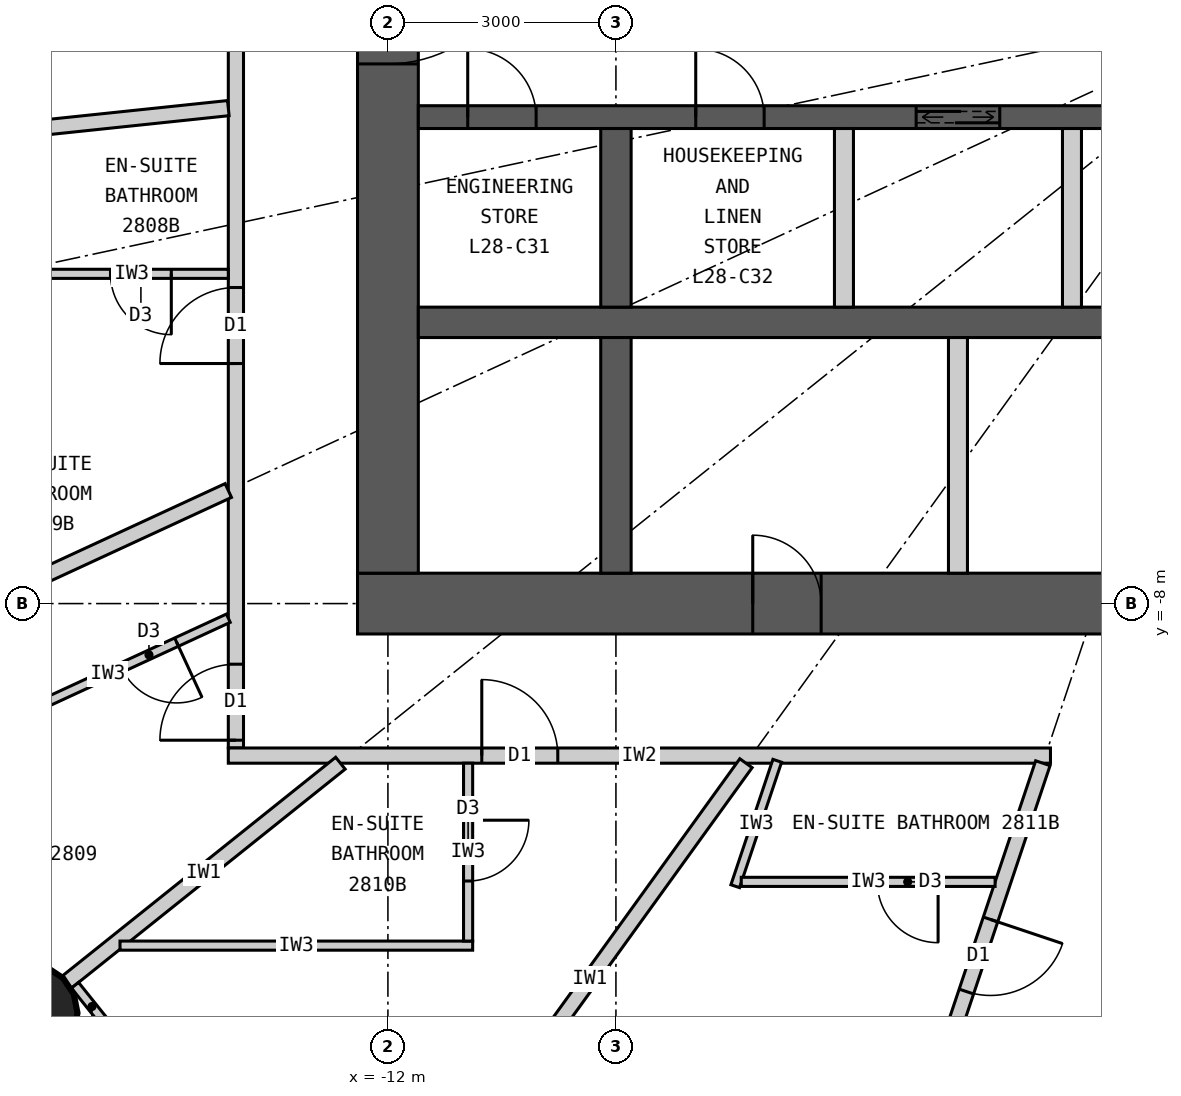
"""IFC4 building model, lengths in metres.
Left out: names, types, materials, properties, quantities, classifications, styles, units other than length and angle.
Written with IfcOpenShell. Run it as: python <this file> out.ifc"""

import sys

from ifc_helpers import new_model, si_unit, direction, frame, frame_2d, origin, origin_2d, place, context, subcontext, project, spatial, rectangle, circle, extrude, element, fill, save


model = new_model("IFC4")
c1 = context("Model", 3, precision=1e-05, world=origin(), true_north=direction((0.0, 1.0)))
c2 = subcontext(c1, "Body", "Model", "MODEL_VIEW")
j1 = project(units=[si_unit("LENGTHUNIT", "METRE"), si_unit("PLANEANGLEUNIT", "RADIAN")], contexts=[c1])
p1 = place(None, origin())
s1 = spatial("IfcSite", under=j1, at=p1, CompositionType="ELEMENT")
p2 = place(p1, origin())
s2 = spatial("IfcBuilding", under=s1, at=p2, CompositionType="ELEMENT")
p3 = place(p2, frame((0.0, 0.0, 112.2)))
s3 = spatial("IfcBuildingStorey", under=s2, at=p3, CompositionType="ELEMENT", Elevation=112.2)
p4 = place(p3, frame((-16.734, -13.387, 0.0), z_axis=(0.0, 0.0, 1.0), x_axis=(1.0, 0.0, 0.0)))
e1 = element("IfcColumn", 1, at=p4, inside=s3, PredefinedType="COLUMN", context=c2, shape_type="SweptSolid", body=[
    extrude(circle(Radius=0.65, at=origin_2d()), origin(), (0.0, 0.0, 1.0), 3.3),
])
p5 = place(p3, frame((12.4, -8.0, 0.0), z_axis=(0.0, 0.0, 1.0), x_axis=(-1.0, 0.0, 0.0)))
e2 = element("IfcWall", 2, at=p5, inside=s3, PredefinedType="SHEAR", context=c2, shape_type="SweptSolid", body=[
    extrude(rectangle(XDim=24.8, YDim=0.8, at=frame_2d((12.4, 0.0))), origin(), (0.0, 0.0, 1.0), 3.3),
])
p6 = place(p5, frame((11.1, 0.0, 0.0)))
e3 = element("IfcOpeningElement", 3, at=p6, cuts=e2, PredefinedType="OPENING", context=c2, shape_type="SweptSolid", body=[
    extrude(rectangle(XDim=1.2, YDim=2.2, at=frame_2d((0.6, 1.1))), frame((0.0, 0.41, 0.0), z_axis=(0.0, -1.0, 0.0), x_axis=(1.0, 0.0, 0.0)), (0.0, 0.0, 1.0), 0.82),
])
p7 = place(p5, frame((18.7, 0.0, 0.0)))
e4 = element("IfcOpeningElement", 4, at=p7, cuts=e2, PredefinedType="OPENING", context=c2, shape_type="SweptSolid", body=[
    extrude(rectangle(XDim=0.9, YDim=2.2, at=frame_2d((0.45, 1.1))), frame((0.0, 0.41, 0.0), z_axis=(0.0, -1.0, 0.0), x_axis=(1.0, 0.0, 0.0)), (0.0, 0.0, 1.0), 0.82),
])
p8 = place(p3, frame((-12.0, 7.6, 0.0), z_axis=(0.0, 0.0, 1.0), x_axis=(0.0, -1.0, 0.0)))
e5 = element("IfcWall", 5, at=p8, inside=s3, PredefinedType="SHEAR", context=c2, shape_type="SweptSolid", body=[
    extrude(rectangle(XDim=15.2, YDim=0.8, at=frame_2d((7.6, 0.0))), origin(), (0.0, 0.0, 1.0), 3.3),
])
p9 = place(p8, frame((6.7, 0.0, 0.0)))
e6 = element("IfcOpeningElement", 6, at=p9, cuts=e5, PredefinedType="OPENING", context=c2, shape_type="SweptSolid", body=[
    extrude(rectangle(XDim=1.8, YDim=2.2, at=frame_2d((0.9, 1.1))), frame((0.0, 0.41, 0.0), z_axis=(0.0, -1.0, 0.0), x_axis=(1.0, 0.0, 0.0)), (0.0, 0.0, 1.0), 0.82),
])
p10 = place(p3, frame((-11.6, -4.3, 0.0), z_axis=(0.0, 0.0, 1.0), x_axis=(1.0, 0.0, 0.0)))
e7 = element("IfcWall", 7, at=p10, inside=s3, PredefinedType="SHEAR", context=c2, shape_type="SweptSolid", body=[
    extrude(rectangle(XDim=23.2, YDim=0.4, at=frame_2d((11.6, 0.0))), origin(), (0.0, 0.0, 1.0), 3.3),
])
p11 = place(p3, frame((-11.6, -1.6, 0.0), z_axis=(0.0, 0.0, 1.0), x_axis=(1.0, 0.0, 0.0)))
e8 = element("IfcWall", 8, at=p11, inside=s3, PredefinedType="SHEAR", context=c2, shape_type="SweptSolid", body=[
    extrude(rectangle(XDim=23.2, YDim=0.3, at=frame_2d((11.6, 0.0))), origin(), (0.0, 0.0, 1.0), 3.3),
])
p12 = place(p11, frame((6.55, 0.0, 0.0)))
e9 = element("IfcOpeningElement", 9, at=p12, cuts=e8, PredefinedType="OPENING", context=c2, shape_type="SweptSolid", body=[
    extrude(rectangle(XDim=1.1, YDim=2.2, at=frame_2d((0.55, 1.1))), frame((0.0, 0.16, 0.0), z_axis=(0.0, -1.0, 0.0), x_axis=(1.0, 0.0, 0.0)), (0.0, 0.0, 1.0), 0.32),
])
p13 = place(p11, frame((15.3, 0.0, 0.0)))
e10 = element("IfcOpeningElement", 10, at=p13, cuts=e8, PredefinedType="OPENING", context=c2, shape_type="SweptSolid", body=[
    extrude(rectangle(XDim=1.6, YDim=2.4, at=frame_2d((0.8, 1.2))), frame((0.0, 0.16, 0.0), z_axis=(0.0, -1.0, 0.0), x_axis=(1.0, 0.0, 0.0)), (0.0, 0.0, 1.0), 0.32),
])
p14 = place(p11, frame((0.65, 0.0, 0.0)))
e11 = element("IfcOpeningElement", 11, at=p14, cuts=e8, PredefinedType="OPENING", context=c2, shape_type="SweptSolid", body=[
    extrude(rectangle(XDim=0.9, YDim=2.2, at=frame_2d((0.45, 1.1))), frame((0.0, 0.16, 0.0), z_axis=(0.0, -1.0, 0.0), x_axis=(1.0, 0.0, 0.0)), (0.0, 0.0, 1.0), 0.32),
])
p15 = place(p11, frame((3.65, 0.0, 0.0)))
e12 = element("IfcOpeningElement", 12, at=p15, cuts=e8, PredefinedType="OPENING", context=c2, shape_type="SweptSolid", body=[
    extrude(rectangle(XDim=0.9, YDim=2.2, at=frame_2d((0.45, 1.1))), frame((0.0, 0.16, 0.0), z_axis=(0.0, -1.0, 0.0), x_axis=(1.0, 0.0, 0.0)), (0.0, 0.0, 1.0), 0.32),
])
p16 = place(p11, frame((21.65, 0.0, 0.0)))
e13 = element("IfcOpeningElement", 13, at=p16, cuts=e8, PredefinedType="OPENING", context=c2, shape_type="SweptSolid", body=[
    extrude(rectangle(XDim=0.9, YDim=2.2, at=frame_2d((0.45, 1.1))), frame((0.0, 0.16, 0.0), z_axis=(0.0, -1.0, 0.0), x_axis=(1.0, 0.0, 0.0)), (0.0, 0.0, 1.0), 0.32),
])
p17 = place(p3, frame((-9.0, -4.1, 0.0), z_axis=(0.0, 0.0, 1.0), x_axis=(0.0, 1.0, 0.0)))
e14 = element("IfcWall", 14, at=p17, inside=s3, PredefinedType="SHEAR", context=c2, shape_type="SweptSolid", body=[
    extrude(rectangle(XDim=2.35, YDim=0.4, at=frame_2d((1.175, 0.0))), origin(), (0.0, 0.0, 1.0), 3.3),
])
p18 = place(p3, frame((-9.0, -7.6, 0.0), z_axis=(0.0, 0.0, 1.0), x_axis=(0.0, 1.0, 0.0)))
e15 = element("IfcWall", 15, at=p18, inside=s3, PredefinedType="SHEAR", context=c2, shape_type="SweptSolid", body=[
    extrude(rectangle(XDim=3.1, YDim=0.4, at=frame_2d((1.55, 0.0))), origin(), (0.0, 0.0, 1.0), 3.3),
])
p19 = place(p3, frame((-4.5, -7.6, 0.0), z_axis=(0.0, 0.0, 1.0), x_axis=(0.0, 1.0, 0.0)))
e16 = element("IfcWall", 16, at=p19, inside=s3, PredefinedType="PARTITIONING", context=c2, shape_type="SweptSolid", body=[
    extrude(rectangle(XDim=3.1, YDim=0.25, at=frame_2d((1.55, 0.0))), origin(), (0.0, 0.0, 1.0), 3.3),
])
for number, where, z_axis, x_axis in (
    (17, (-6.0, -4.1, 0.0), (0.0, 0.0, 1.0), (0.0, 1.0, 0.0)),
    (18, (-3.0, -4.1, 0.0), (0.0, 0.0, 1.0), (0.0, 1.0, 0.0)),
):
    element("IfcWall", number, at=place(p3, frame(where, z_axis=z_axis, x_axis=x_axis)), inside=s3, PredefinedType="PARTITIONING", context=c2, shape_type="SweptSolid", body=[
        extrude(rectangle(XDim=2.35, YDim=0.25, at=frame_2d((1.175, 0.0))), origin(), (0.0, 0.0, 1.0), 3.3),
    ])
p20 = place(p3, frame((-14.0, 9.9, 0.0), z_axis=(0.0, 0.0, 1.0), x_axis=(0.0, -1.0, 0.0)))
e19 = element("IfcWall", 19, at=p20, inside=s3, PredefinedType="PARTITIONING", context=c2, shape_type="SweptSolid", body=[
    extrude(rectangle(XDim=19.8, YDim=0.2, at=frame_2d((9.9, 0.0))), origin(), (0.0, 0.0, 1.0), 3.12),
])
p21 = place(p20, frame((3.622, 0.0, 0.0)))
e20 = element("IfcOpeningElement", 20, at=p21, cuts=e19, PredefinedType="OPENING", context=c2, shape_type="SweptSolid", body=[
    extrude(rectangle(XDim=1.0, YDim=2.2, at=frame_2d((0.5, 1.1))), frame((0.0, 0.11, 0.0), z_axis=(0.0, -1.0, 0.0), x_axis=(1.0, 0.0, 0.0)), (0.0, 0.0, 1.0), 0.22),
])
p22 = place(p20, frame((9.238, 0.0, 0.0)))
e21 = element("IfcOpeningElement", 21, at=p22, cuts=e19, PredefinedType="OPENING", context=c2, shape_type="SweptSolid", body=[
    extrude(rectangle(XDim=1.0, YDim=2.2, at=frame_2d((0.5, 1.1))), frame((0.0, 0.11, 0.0), z_axis=(0.0, -1.0, 0.0), x_axis=(1.0, 0.0, 0.0)), (0.0, 0.0, 1.0), 0.22),
])
p23 = place(p20, frame((13.742, 0.0, 0.0)))
e22 = element("IfcOpeningElement", 22, at=p23, cuts=e19, PredefinedType="OPENING", context=c2, shape_type="SweptSolid", body=[
    extrude(rectangle(XDim=1.0, YDim=2.2, at=frame_2d((0.5, 1.1))), frame((0.0, 0.11, 0.0), z_axis=(0.0, -1.0, 0.0), x_axis=(1.0, 0.0, 0.0)), (0.0, 0.0, 1.0), 0.22),
])
p24 = place(p20, frame((18.698, 0.0, 0.0)))
e23 = element("IfcOpeningElement", 23, at=p24, cuts=e19, PredefinedType="OPENING", context=c2, shape_type="SweptSolid", body=[
    extrude(rectangle(XDim=1.0, YDim=2.2, at=frame_2d((0.5, 1.1))), frame((0.0, 0.11, 0.0), z_axis=(0.0, -1.0, 0.0), x_axis=(1.0, 0.0, 0.0)), (0.0, 0.0, 1.0), 0.22),
])
p25 = place(p3, frame((-3.283, -10.0, 0.0), z_axis=(0.0, 0.0, 1.0), x_axis=(-1.0, 0.0, 0.0)))
e24 = element("IfcWall", 24, at=p25, inside=s3, PredefinedType="PARTITIONING", context=c2, shape_type="SweptSolid", body=[
    extrude(rectangle(XDim=10.817, YDim=0.2, at=frame_2d((5.409, 0.0))), origin(), (0.0, 0.0, 1.0), 3.12),
])
p26 = place(p25, frame((6.482, 0.0, 0.0)))
e25 = element("IfcOpeningElement", 25, at=p26, cuts=e24, PredefinedType="OPENING", context=c2, shape_type="SweptSolid", body=[
    extrude(rectangle(XDim=1.0, YDim=2.2, at=frame_2d((0.5, 1.1))), frame((0.0, 0.11, 0.0), z_axis=(0.0, -1.0, 0.0), x_axis=(1.0, 0.0, 0.0)), (0.0, 0.0, 1.0), 0.22),
])
p27 = place(p3, frame((-14.1, -1.482, 0.0), z_axis=(0.0, 0.0, 1.0), x_axis=(-0.994523202615, -0.104516024894, 0.0)))
e26 = element("IfcWall", 26, at=p27, inside=s3, PredefinedType="PARTITIONING", context=c2, shape_type="SweptSolid", body=[
    extrude(rectangle(XDim=10.091, YDim=0.2, at=frame_2d((5.045, 0.0))), origin(), (0.0, 0.0, 1.0), 2.47),
])
p28 = place(p3, frame((-14.1, -6.512, 0.0), z_axis=(0.0, 0.0, 1.0), x_axis=(-0.907833019998, -0.419331858797, 0.0)))
e27 = element("IfcWall", 27, at=p28, inside=s3, PredefinedType="PARTITIONING", context=c2, shape_type="SweptSolid", body=[
    extrude(rectangle(XDim=6.505, YDim=0.2, at=frame_2d((3.252, 0.0))), origin(), (0.0, 0.0, 1.0), 2.27),
])
p29 = place(p3, frame((-12.625, -10.1, 0.0), z_axis=(0.0, 0.0, 1.0), x_axis=(-0.780863644897, -0.624701503182, 0.0)))
e28 = element("IfcWall", 28, at=p29, inside=s3, PredefinedType="PARTITIONING", context=c2, shape_type="SweptSolid", body=[
    extrude(rectangle(XDim=4.612, YDim=0.2, at=frame_2d((2.306, 0.0))), origin(), (0.0, 0.0, 1.0), 2.37),
])
p30 = place(p3, frame((-7.289, -10.1, 0.0), z_axis=(0.0, 0.0, 1.0), x_axis=(-0.585217367024, -0.81087645997, 0.0)))
e29 = element("IfcWall", 29, at=p30, inside=s3, PredefinedType="PARTITIONING", context=c2, shape_type="SweptSolid", body=[
    extrude(rectangle(XDim=7.016, YDim=0.2, at=frame_2d((3.508, 0.0))), origin(), (0.0, 0.0, 1.0), 2.37),
])
p31 = place(p3, frame((-3.383, -10.1, 0.0), z_axis=(0.0, 0.0, 1.0), x_axis=(-0.317603705574, -0.948223542318, 0.0)))
e30 = element("IfcWall", 30, at=p31, inside=s3, PredefinedType="PARTITIONING", context=c2, shape_type="SweptSolid", body=[
    extrude(rectangle(XDim=7.823, YDim=0.2, at=frame_2d((3.912, 0.0))), origin(), (0.0, 0.0, 1.0), 2.37),
])
p32 = place(p31, frame((2.168, 0.0, 0.0)))
e31 = element("IfcOpeningElement", 31, at=p32, cuts=e30, PredefinedType="OPENING", context=c2, shape_type="SweptSolid", body=[
    extrude(rectangle(XDim=1.0, YDim=2.2, at=frame_2d((0.5, 1.1))), frame((0.0, 0.11, 0.0), z_axis=(0.0, -1.0, 0.0), x_axis=(1.0, 0.0, 0.0)), (0.0, 0.0, 1.0), 0.22),
])
p33 = place(p3, frame((-1.665, -10.1, 0.0), z_axis=(0.0, 0.0, 1.0), x_axis=(-0.162660519103, -0.986682094459, 0.0)))
e32 = element("IfcWall", 32, at=p33, inside=s3, PredefinedType="PARTITIONING", context=c2, shape_type="SweptSolid", body=[
    extrude(rectangle(XDim=9.111, YDim=0.2, at=frame_2d((4.555, 0.0))), origin(), (0.0, 0.0, 1.0), 3.12),
])
p34 = place(p33, frame((1.86, 0.0, 0.0)))
e33 = element("IfcOpeningElement", 33, at=p34, cuts=e32, PredefinedType="OPENING", context=c2, shape_type="SweptSolid", body=[
    extrude(rectangle(XDim=1.0, YDim=2.2, at=frame_2d((0.5, 1.1))), frame((0.0, 0.11, 0.0), z_axis=(0.0, -1.0, 0.0), x_axis=(1.0, 0.0, 0.0)), (0.0, 0.0, 1.0), 0.22),
])
p35 = place(p3, frame((-14.1, -3.662, 0.0), z_axis=(0.0, 0.0, 1.0), x_axis=(-1.0, 0.0, 0.0)))
e34 = element("IfcWall", 34, at=p35, inside=s3, PredefinedType="PARTITIONING", context=c2, shape_type="SweptSolid", body=[
    extrude(rectangle(XDim=2.54, YDim=0.12, at=frame_2d((1.27, 0.0))), origin(), (0.0, 0.0, 1.0), 2.37),
])
p36 = place(p35, frame((0.75, 0.0, 0.0)))
e35 = element("IfcOpeningElement", 35, at=p36, cuts=e34, PredefinedType="OPENING", context=c2, shape_type="SweptSolid", body=[
    extrude(rectangle(XDim=0.8, YDim=2.1, at=frame_2d((0.4, 1.05))), frame((0.0, 0.07, 0.0), z_axis=(0.0, -1.0, 0.0), x_axis=(1.0, 0.0, 0.0)), (0.0, 0.0, 1.0), 0.14),
])
p37 = place(p3, frame((-14.1, -8.193, 0.0), z_axis=(0.0, 0.0, 1.0), x_axis=(-0.907836493557, -0.419324338628, 0.0)))
e36 = element("IfcWall", 36, at=p37, inside=s3, PredefinedType="PARTITIONING", context=c2, shape_type="SweptSolid", body=[
    extrude(rectangle(XDim=3.49, YDim=0.12, at=frame_2d((1.745, 0.0))), origin(), (0.0, 0.0, 1.0), 3.12),
])
p38 = place(p37, frame((0.75, 0.0, 0.0)))
e37 = element("IfcOpeningElement", 37, at=p38, cuts=e36, PredefinedType="OPENING", context=c2, shape_type="SweptSolid", body=[
    extrude(rectangle(XDim=0.8, YDim=2.1, at=frame_2d((0.4, 1.05))), frame((0.0, 0.07, 0.0), z_axis=(0.0, -1.0, 0.0), x_axis=(1.0, 0.0, 0.0)), (0.0, 0.0, 1.0), 0.14),
])
p39 = place(p3, frame((-15.525, -12.5, 0.0), z_axis=(0.0, 0.0, 1.0), x_axis=(1.0, 0.0, 0.0)))
e38 = element("IfcWall", 38, at=p39, inside=s3, PredefinedType="PARTITIONING", context=c2, shape_type="SweptSolid", body=[
    extrude(rectangle(XDim=4.64, YDim=0.12, at=frame_2d((2.32, 0.0))), origin(), (0.0, 0.0, 1.0), 3.12),
])
p40 = place(p3, frame((-10.945, -10.1, 0.0), z_axis=(0.0, 0.0, 1.0), x_axis=(0.0, -1.0, 0.0)))
e39 = element("IfcWall", 39, at=p40, inside=s3, PredefinedType="PARTITIONING", context=c2, shape_type="SweptSolid", body=[
    extrude(rectangle(XDim=2.34, YDim=0.12, at=frame_2d((1.17, 0.0))), origin(), (0.0, 0.0, 1.0), 3.12),
])
p41 = place(p40, frame((0.75, 0.0, 0.0)))
e40 = element("IfcOpeningElement", 40, at=p41, cuts=e39, PredefinedType="OPENING", context=c2, shape_type="SweptSolid", body=[
    extrude(rectangle(XDim=0.8, YDim=2.1, at=frame_2d((0.4, 1.05))), frame((0.0, 0.07, 0.0), z_axis=(0.0, -1.0, 0.0), x_axis=(1.0, 0.0, 0.0)), (0.0, 0.0, 1.0), 0.14),
])
p42 = place(p3, frame((-6.878, -10.068, 0.0), z_axis=(0.0, 0.0, 1.0), x_axis=(-0.317532394508, -0.948247424694, 0.0)))
e41 = element("IfcWall", 41, at=p42, inside=s3, PredefinedType="PARTITIONING", context=c2, shape_type="SweptSolid", body=[
    extrude(rectangle(XDim=1.74, YDim=0.12, at=frame_2d((0.87, 0.0))), origin(), (0.0, 0.0, 1.0), 3.12),
])
p43 = place(p3, frame((-4.011, -11.661, 0.0), z_axis=(0.0, 0.0, 1.0), x_axis=(-1.0, 0.0, 0.0)))
e42 = element("IfcWall", 42, at=p43, inside=s3, PredefinedType="PARTITIONING", context=c2, shape_type="SweptSolid", body=[
    extrude(rectangle(XDim=3.34, YDim=0.12, at=frame_2d((1.67, 0.0))), origin(), (0.0, 0.0, 1.0), 3.12),
])
p44 = place(p43, frame((0.75, 0.0, 0.0)))
e43 = element("IfcOpeningElement", 43, at=p44, cuts=e42, PredefinedType="OPENING", context=c2, shape_type="SweptSolid", body=[
    extrude(rectangle(XDim=0.8, YDim=2.1, at=frame_2d((0.4, 1.05))), frame((0.0, 0.07, 0.0), z_axis=(0.0, -1.0, 0.0), x_axis=(1.0, 0.0, 0.0)), (0.0, 0.0, 1.0), 0.14),
])
p45 = place(p3, frame((-16.117, -13.022, 0.0), z_axis=(0.0, 0.0, 1.0), x_axis=(0.62465344249, -0.780902091677, 0.0)))
e44 = element("IfcWall", 44, at=p45, inside=s3, PredefinedType="PARTITIONING", context=c2, shape_type="SweptSolid", body=[
    extrude(rectangle(XDim=0.716, YDim=0.12, at=frame_2d((0.358, 0.0))), origin(), (0.0, 0.0, 1.0), 3.12),
])
p46 = place(p36, origin())
e45 = element("IfcDoor", 45, at=p46, inside=s3, OperationType="SINGLE_SWING_LEFT", PredefinedType="DOOR", context=c2, shape_type="SweptSolid", body=[
    extrude(rectangle(XDim=0.8, YDim=2.1, at=frame_2d((0.4, 1.05))), frame((0.0, 0.025, 0.0), z_axis=(0.0, -1.0, 0.0), x_axis=(1.0, 0.0, 0.0)), (0.0, 0.0, 1.0), 0.05),
])
fill(e35, e45)
p47 = place(p23, origin())
e46 = element("IfcDoor", 46, at=p47, inside=s3, OperationType="SINGLE_SWING_RIGHT", PredefinedType="DOOR", context=c2, shape_type="SweptSolid", body=[
    extrude(rectangle(XDim=1.0, YDim=2.2, at=frame_2d((0.5, 1.1))), frame((0.0, 0.025, 0.0), z_axis=(0.0, -1.0, 0.0), x_axis=(1.0, 0.0, 0.0)), (0.0, 0.0, 1.0), 0.05),
])
fill(e22, e46)
p48 = place(p38, origin())
e47 = element("IfcDoor", 47, at=p48, inside=s3, OperationType="SINGLE_SWING_LEFT", PredefinedType="DOOR", context=c2, shape_type="SweptSolid", body=[
    extrude(rectangle(XDim=0.8, YDim=2.1, at=frame_2d((0.4, 1.05))), frame((0.0, 0.025, 0.0), z_axis=(0.0, -1.0, 0.0), x_axis=(1.0, 0.0, 0.0)), (0.0, 0.0, 1.0), 0.05),
])
fill(e37, e47)
p49 = place(p24, origin())
e48 = element("IfcDoor", 48, at=p49, inside=s3, OperationType="SINGLE_SWING_RIGHT", PredefinedType="DOOR", context=c2, shape_type="SweptSolid", body=[
    extrude(rectangle(XDim=1.0, YDim=2.2, at=frame_2d((0.5, 1.1))), frame((0.0, 0.025, 0.0), z_axis=(0.0, -1.0, 0.0), x_axis=(1.0, 0.0, 0.0)), (0.0, 0.0, 1.0), 0.05),
])
fill(e23, e48)
p50 = place(p41, origin())
e49 = element("IfcDoor", 49, at=p50, inside=s3, OperationType="SINGLE_SWING_LEFT", PredefinedType="DOOR", context=c2, shape_type="SweptSolid", body=[
    extrude(rectangle(XDim=0.8, YDim=2.1, at=frame_2d((0.4, 1.05))), frame((0.0, 0.025, 0.0), z_axis=(0.0, -1.0, 0.0), x_axis=(1.0, 0.0, 0.0)), (0.0, 0.0, 1.0), 0.05),
])
fill(e40, e49)
p51 = place(p26, origin())
e50 = element("IfcDoor", 50, at=p51, inside=s3, OperationType="SINGLE_SWING_RIGHT", PredefinedType="DOOR", context=c2, shape_type="SweptSolid", body=[
    extrude(rectangle(XDim=1.0, YDim=2.2, at=frame_2d((0.5, 1.1))), frame((0.0, 0.025, 0.0), z_axis=(0.0, -1.0, 0.0), x_axis=(1.0, 0.0, 0.0)), (0.0, 0.0, 1.0), 0.05),
])
fill(e25, e50)
p52 = place(p44, origin())
e51 = element("IfcDoor", 51, at=p52, inside=s3, OperationType="SINGLE_SWING_LEFT", PredefinedType="DOOR", context=c2, shape_type="SweptSolid", body=[
    extrude(rectangle(XDim=0.8, YDim=2.1, at=frame_2d((0.4, 1.05))), frame((0.0, 0.025, 0.0), z_axis=(0.0, -1.0, 0.0), x_axis=(1.0, 0.0, 0.0)), (0.0, 0.0, 1.0), 0.05),
])
fill(e43, e51)
p53 = place(p32, origin())
e52 = element("IfcDoor", 52, at=p53, inside=s3, OperationType="SINGLE_SWING_LEFT", PredefinedType="DOOR", context=c2, shape_type="SweptSolid", body=[
    extrude(rectangle(XDim=1.0, YDim=2.2, at=frame_2d((0.5, 1.1))), frame((0.0, 0.025, 0.0), z_axis=(0.0, -1.0, 0.0), x_axis=(1.0, 0.0, 0.0)), (0.0, 0.0, 1.0), 0.05),
])
fill(e31, e52)
p54 = place(p7, origin())
e53 = element("IfcDoor", 53, at=p54, inside=s3, OperationType="SINGLE_SWING_RIGHT", PredefinedType="DOOR", context=c2, shape_type="SweptSolid", body=[
    extrude(rectangle(XDim=0.9, YDim=2.2, at=frame_2d((0.45, 1.1))), frame((0.0, 0.025, 0.0), z_axis=(0.0, -1.0, 0.0), x_axis=(1.0, 0.0, 0.0)), (0.0, 0.0, 1.0), 0.05),
])
fill(e4, e53)
p55 = place(p12, origin())
e54 = element("IfcDoor", 54, at=p55, inside=s3, OperationType="DOUBLE_DOOR_SLIDING", PredefinedType="DOOR", context=c2, shape_type="SweptSolid", body=[
    extrude(rectangle(XDim=1.1, YDim=2.2, at=frame_2d((0.55, 1.1))), frame((0.0, 0.025, 0.0), z_axis=(0.0, -1.0, 0.0), x_axis=(1.0, 0.0, 0.0)), (0.0, 0.0, 1.0), 0.05),
])
fill(e9, e54)
p56 = place(p14, origin())
e55 = element("IfcDoor", 55, at=p56, inside=s3, OperationType="SINGLE_SWING_LEFT", PredefinedType="DOOR", context=c2, shape_type="SweptSolid", body=[
    extrude(rectangle(XDim=0.9, YDim=2.2, at=frame_2d((0.45, 1.1))), frame((0.0, 0.025, 0.0), z_axis=(0.0, -1.0, 0.0), x_axis=(1.0, 0.0, 0.0)), (0.0, 0.0, 1.0), 0.05),
])
fill(e11, e55)
p57 = place(p15, origin())
e56 = element("IfcDoor", 56, at=p57, inside=s3, OperationType="SINGLE_SWING_LEFT", PredefinedType="DOOR", context=c2, shape_type="SweptSolid", body=[
    extrude(rectangle(XDim=0.9, YDim=2.2, at=frame_2d((0.45, 1.1))), frame((0.0, 0.025, 0.0), z_axis=(0.0, -1.0, 0.0), x_axis=(1.0, 0.0, 0.0)), (0.0, 0.0, 1.0), 0.05),
])
fill(e12, e56)
p58 = place(p9, origin())
e57 = element("IfcDoor", 57, at=p58, inside=s3, OperationType="DOUBLE_DOOR_DOUBLE_SWING", PredefinedType="DOOR", context=c2, shape_type="SweptSolid", body=[
    extrude(rectangle(XDim=1.8, YDim=2.2, at=frame_2d((0.9, 1.1))), frame((0.0, 0.025, 0.0), z_axis=(0.0, -1.0, 0.0), x_axis=(1.0, 0.0, 0.0)), (0.0, 0.0, 1.0), 0.05),
])
fill(e6, e57)
save(model, sys.argv[1])
